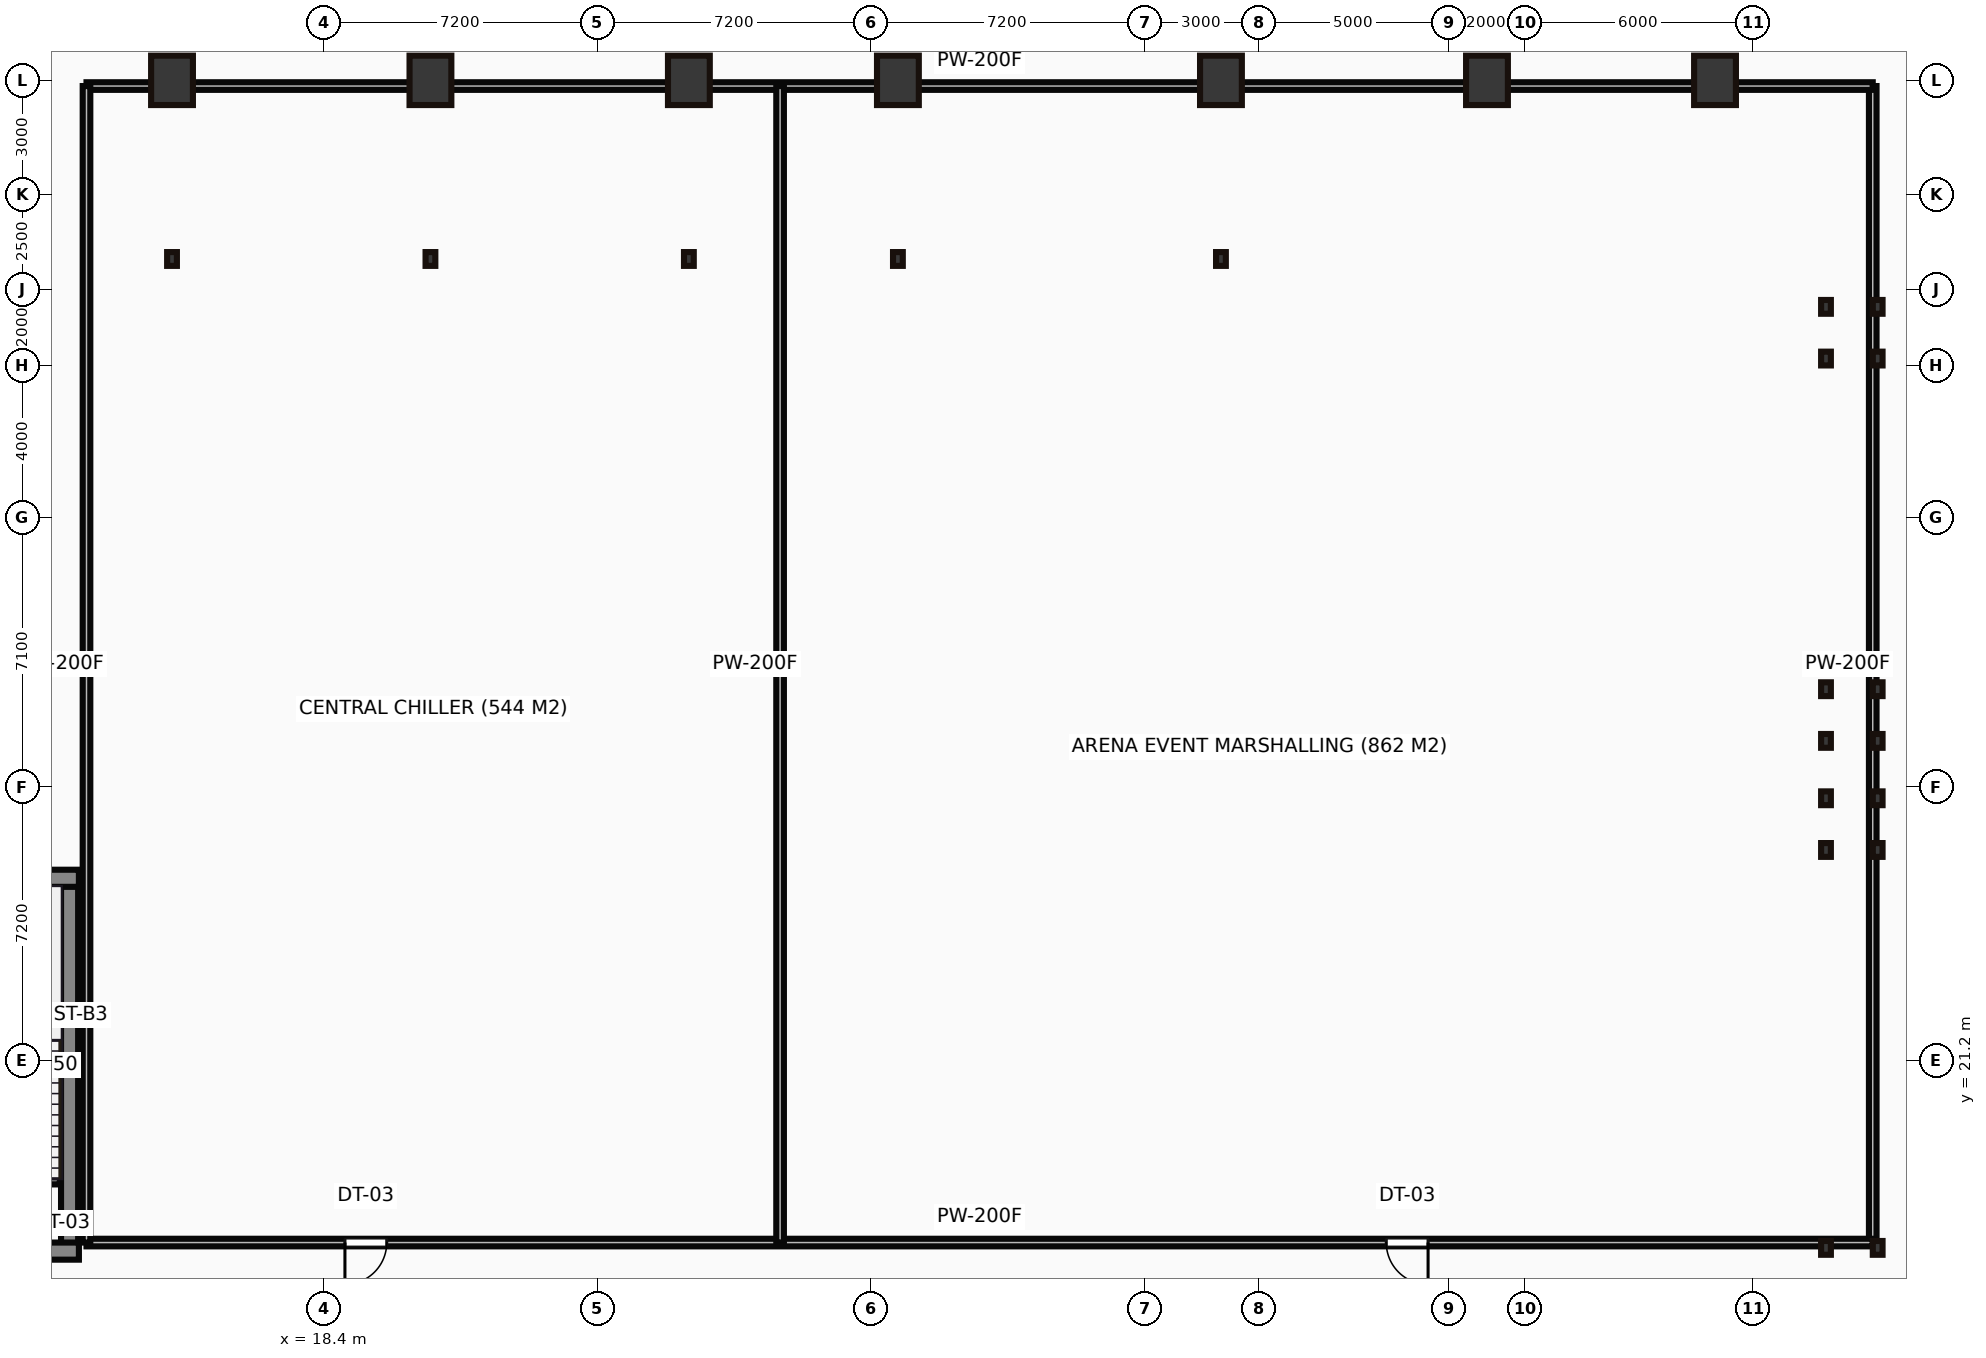
"""IFC4 building model, lengths in metres.
Left out: names, types, materials, properties, quantities, classifications, styles, units other than length and angle.
Written with IfcOpenShell. Run it as: python <this file> out.ifc"""

import sys

from ifc_helpers import new_model, si_unit, direction, frame, frame_2d, origin, origin_2d, place, context, subcontext, project, spatial, rectangle, hollow_rectangle, i_section, extrude, source, transform, mapped, element, fill, save


model = new_model("IFC4")
c1 = context("Model", 3, precision=1e-05, world=origin(), true_north=direction((0.0, 1.0)))
c2 = subcontext(c1, "Body", "Model", "MODEL_VIEW")
j1 = project(units=[si_unit("LENGTHUNIT", "METRE"), si_unit("PLANEANGLEUNIT", "RADIAN")], contexts=[c1])
p1 = place(None, origin())
s1 = spatial("IfcSite", under=j1, at=p1, CompositionType="ELEMENT")
p2 = place(p1, origin())
s2 = spatial("IfcBuilding", under=s1, at=p2, CompositionType="ELEMENT")
p3 = place(p2, frame((0.0, 0.0, -10.0)))
s3 = spatial("IfcBuildingStorey", under=s2, at=p3, CompositionType="ELEMENT", Elevation=-10.0)
m1 = source(origin(), c2, "Body", "SweptSolid", [
    extrude(hollow_rectangle(XDim=1.1, YDim=1.3, WallThickness=0.055, at=origin_2d()), origin(), (0.0, 0.0, 1.0), 5.0),
])
for number, where, z_axis, x_axis in (
    (1, (14.4, 47.0, 0.0), (0.0, 0.0, 1.0), (1.0, 0.0, 0.0)),
    (2, (21.2, 47.0, 0.0), (0.0, 0.0, 1.0), (1.0, 0.0, 0.0)),
    (3, (28.0, 47.0, 0.0), (0.0, 0.0, 1.0), (1.0, 0.0, 0.0)),
    (4, (33.5, 47.0, 0.0), (0.0, 0.0, 1.0), (1.0, 0.0, 0.0)),
    (5, (42.0, 47.0, 0.0), (0.0, 0.0, 1.0), (1.0, 0.0, 0.0)),
    (6, (49.0, 47.0, 0.0), (0.0, 0.0, 1.0), (1.0, 0.0, 0.0)),
    (7, (55.0, 47.0, 0.0), (0.0, 0.0, 1.0), (1.0, 0.0, 0.0)),
):
    element("IfcColumn", number, at=place(p3, frame(where, z_axis=z_axis, x_axis=x_axis)), inside=s3, PredefinedType="PILASTER", context=c2, shape_type="MappedRepresentation", body=[
        mapped(m1, transform((0.0, 0.0, 0.0))),
    ])
m2 = source(origin(), c2, "Body", "SweptSolid", [
    extrude(i_section(OverallWidth=0.257, OverallDepth=0.363, WebThickness=0.013, FlangeThickness=0.022, at=origin_2d()), origin(), (0.0, 0.0, 1.0), 5.0),
])
for number, where, z_axis, x_axis in (
    (8, (14.4, 42.3, 0.0), (0.0, 0.0, 1.0), (1.0, 0.0, 0.0)),
    (9, (21.2, 42.3, 0.0), (0.0, 0.0, 1.0), (1.0, 0.0, 0.0)),
    (10, (28.0, 42.3, 0.0), (0.0, 0.0, 1.0), (1.0, 0.0, 0.0)),
    (11, (33.5, 42.3, 0.0), (0.0, 0.0, 1.0), (1.0, 0.0, 0.0)),
    (12, (42.0, 42.3, 0.0), (0.0, 0.0, 1.0), (1.0, 0.0, 0.0)),
):
    element("IfcColumn", number, at=place(p3, frame(where, z_axis=z_axis, x_axis=x_axis)), inside=s3, PredefinedType="COLUMN", context=c2, shape_type="MappedRepresentation", body=[
        mapped(m2, transform((0.0, 0.0, 0.0))),
    ])
m3 = source(origin(), c2, "Body", "SweptSolid", [
    extrude(rectangle(XDim=4.1, YDim=0.45, at=frame_2d((2.05, 0.0))), origin(), (0.0, 0.0, 1.0), 4.55),
])
p4 = place(p3, frame((7.85, 16.195, 0.45), z_axis=(0.0, 0.0, 1.0), x_axis=(1.0, 0.0, 0.0)))
e13 = element("IfcWall", 13, at=p4, inside=s3, PredefinedType="SHEAR", context=c2, shape_type="MappedRepresentation", body=[
    mapped(m3, transform((0.0, 0.0, 0.0))),
])
p5 = place(p4, frame((1.5, 0.0, 0.0)))
e14 = element("IfcOpeningElement", 14, at=p5, cuts=e13, PredefinedType="OPENING", context=c2, shape_type="SweptSolid", body=[
    extrude(rectangle(XDim=1.1, YDim=2.15, at=frame_2d((0.55, 1.075))), frame((0.0, 0.235, 0.0), z_axis=(0.0, -1.0, 0.0), x_axis=(1.0, 0.0, 0.0)), (0.0, 0.0, 1.0), 0.47),
])
m4 = source(origin(), c2, "Body", "SweptSolid", [
    extrude(rectangle(XDim=9.4, YDim=0.45, at=frame_2d((4.7, 0.0))), origin(), (0.0, 0.0, 1.0), 4.55),
])
p6 = place(p3, frame((11.705, 16.4, 0.45), z_axis=(0.0, 0.0, 1.0), x_axis=(0.0, 1.0, 0.0)))
e15 = element("IfcWall", 15, at=p6, inside=s3, PredefinedType="SHEAR", context=c2, shape_type="MappedRepresentation", body=[
    mapped(m4, transform((0.0, 0.0, 0.0))),
])
p7 = place(p3, frame((7.85, 26.005, 0.45), z_axis=(0.0, 0.0, 1.0), x_axis=(1.0, 0.0, 0.0)))
e16 = element("IfcWall", 16, at=p7, inside=s3, PredefinedType="SHEAR", context=c2, shape_type="MappedRepresentation", body=[
    mapped(m3, transform((0.0, 0.0, 0.0))),
])
m5 = source(origin(), c2, "Body", "SweptSolid", [
    extrude(rectangle(XDim=3.1, YDim=0.3, at=frame_2d((1.55, 0.0))), origin(), (0.0, 0.0, 1.0), 0.3),
])
p8 = place(p3, frame((11.45, 18.1, -0.3), z_axis=(0.0, 0.0, 1.0), x_axis=(-1.0, 0.0, 0.0)))
e17 = element("IfcWall", 17, at=p8, inside=s3, PredefinedType="SHEAR", context=c2, shape_type="MappedRepresentation", body=[
    mapped(m5, transform((0.0, 0.0, 0.0))),
])
m6 = source(origin(), c2, "Body", "SweptSolid", [
    extrude(i_section(OverallWidth=0.257, OverallDepth=0.363, WebThickness=0.013, FlangeThickness=0.022, at=origin_2d()), origin(), (0.0, 0.0, 1.0), 4.55),
])
for number, where, z_axis, x_axis in (
    (18, (57.92, 16.28, 0.45), (0.0, 0.0, 1.0), (1.0, 0.0, 0.0)),
    (19, (59.28, 16.28, 0.45), (0.0, 0.0, 1.0), (1.0, 0.0, 0.0)),
    (20, (57.92, 26.75, 0.45), (0.0, 0.0, 1.0), (1.0, 0.0, 0.0)),
    (21, (57.92, 28.11, 0.45), (0.0, 0.0, 1.0), (1.0, 0.0, 0.0)),
    (22, (59.28, 26.75, 0.45), (0.0, 0.0, 1.0), (1.0, 0.0, 0.0)),
    (23, (59.28, 28.11, 0.45), (0.0, 0.0, 1.0), (1.0, 0.0, 0.0)),
    (24, (57.92, 29.62, 0.45), (0.0, 0.0, 1.0), (1.0, 0.0, 0.0)),
    (25, (57.92, 30.98, 0.45), (0.0, 0.0, 1.0), (1.0, 0.0, 0.0)),
    (26, (59.28, 29.62, 0.45), (0.0, 0.0, 1.0), (1.0, 0.0, 0.0)),
    (27, (59.28, 30.98, 0.45), (0.0, 0.0, 1.0), (1.0, 0.0, 0.0)),
    (28, (57.92, 39.68, 0.45), (0.0, 0.0, 1.0), (1.0, 0.0, 0.0)),
    (29, (57.92, 41.04, 0.45), (0.0, 0.0, 1.0), (1.0, 0.0, 0.0)),
    (30, (59.28, 39.68, 0.45), (0.0, 0.0, 1.0), (1.0, 0.0, 0.0)),
    (31, (59.28, 41.04, 0.45), (0.0, 0.0, 1.0), (1.0, 0.0, 0.0)),
):
    element("IfcColumn", number, at=place(p3, frame(where, z_axis=z_axis, x_axis=x_axis)), inside=s3, PredefinedType="COLUMN", context=c2, shape_type="MappedRepresentation", body=[
        mapped(m6, transform((0.0, 0.0, 0.0))),
    ])
m7 = source(origin(), c2, "Body", "SweptSolid", [
    extrude(rectangle(XDim=47.0, YDim=0.2, at=frame_2d((23.5, 0.0))), origin(), (0.0, 0.0, 1.0), 4.25),
])
p9 = place(p3, frame((12.15, 16.42, 0.45), z_axis=(0.0, 0.0, 1.0), x_axis=(1.0, 0.0, 0.0)))
e32 = element("IfcWall", 32, at=p9, inside=s3, PredefinedType="PARTITIONING", context=c2, shape_type="MappedRepresentation", body=[
    mapped(m7, transform((0.0, 0.0, 0.0))),
])
p10 = place(p9, frame((6.8, 0.0, 0.0)))
e33 = element("IfcOpeningElement", 33, at=p10, cuts=e32, PredefinedType="OPENING", context=c2, shape_type="SweptSolid", body=[
    extrude(rectangle(XDim=1.1, YDim=2.15, at=frame_2d((0.55, 1.075))), frame((0.0, 0.11, 0.0), z_axis=(0.0, -1.0, 0.0), x_axis=(1.0, 0.0, 0.0)), (0.0, 0.0, 1.0), 0.22),
])
p11 = place(p9, frame((34.2, 0.0, 0.0)))
e34 = element("IfcOpeningElement", 34, at=p11, cuts=e32, PredefinedType="OPENING", context=c2, shape_type="SweptSolid", body=[
    extrude(rectangle(XDim=1.1, YDim=2.15, at=frame_2d((0.55, 1.075))), frame((0.0, 0.11, 0.0), z_axis=(0.0, -1.0, 0.0), x_axis=(1.0, 0.0, 0.0)), (0.0, 0.0, 1.0), 0.22),
])
m8 = source(origin(), c2, "Body", "SweptSolid", [
    extrude(rectangle(XDim=30.43, YDim=0.2, at=frame_2d((15.215, 0.0))), origin(), (0.0, 0.0, 1.0), 4.25),
])
p12 = place(p3, frame((12.15, 16.42, 0.45), z_axis=(0.0, 0.0, 1.0), x_axis=(0.0, 1.0, 0.0)))
e35 = element("IfcWall", 35, at=p12, inside=s3, PredefinedType="PARTITIONING", context=c2, shape_type="MappedRepresentation", body=[
    mapped(m8, transform((0.0, 0.0, 0.0))),
])
m9 = source(origin(), c2, "Body", "SweptSolid", [
    extrude(rectangle(XDim=47.0, YDim=0.2, at=frame_2d((23.5, 0.0))), origin(), (0.0, 0.0, 1.0), 3.394),
])
p13 = place(p3, frame((12.15, 46.85, 0.45), z_axis=(0.0, 0.0, 1.0), x_axis=(1.0, 0.0, 0.0)))
e36 = element("IfcWall", 36, at=p13, inside=s3, PredefinedType="PARTITIONING", context=c2, shape_type="MappedRepresentation", body=[
    mapped(m9, transform((0.0, 0.0, 0.0))),
])
for number, where, z_axis, x_axis in (
    (37, (59.15, 16.42, 0.45), (0.0, 0.0, 1.0), (0.0, 1.0, 0.0)),
    (38, (30.4, 16.42, 0.45), (0.0, 0.0, 1.0), (0.0, 1.0, 0.0)),
):
    element("IfcWall", number, at=place(p3, frame(where, z_axis=z_axis, x_axis=x_axis)), inside=s3, PredefinedType="PARTITIONING", context=c2, shape_type="MappedRepresentation", body=[
        mapped(m8, transform((0.0, 0.0, 0.0))),
    ])
m10 = source(origin(), c2, "Body", "SweptSolid", [
    extrude(rectangle(XDim=1.1, YDim=2.15, at=frame_2d((0.55, 1.075))), frame((0.0, 0.025, 0.0), z_axis=(0.0, -1.0, 0.0), x_axis=(1.0, 0.0, 0.0)), (0.0, 0.0, 1.0), 0.05),
])
p14 = place(p10, origin())
e39 = element("IfcDoor", 39, at=p14, inside=s3, OperationType="SINGLE_SWING_LEFT", PredefinedType="DOOR", context=c2, shape_type="MappedRepresentation", body=[
    mapped(m10, transform((0.0, 0.0, 0.0))),
])
fill(e33, e39)
p15 = place(p11, origin())
e40 = element("IfcDoor", 40, at=p15, inside=s3, OperationType="SINGLE_SWING_RIGHT", PredefinedType="DOOR", context=c2, shape_type="MappedRepresentation", body=[
    mapped(m10, transform((0.0, 0.0, 0.0))),
])
fill(e34, e40)
save(model, sys.argv[1])
